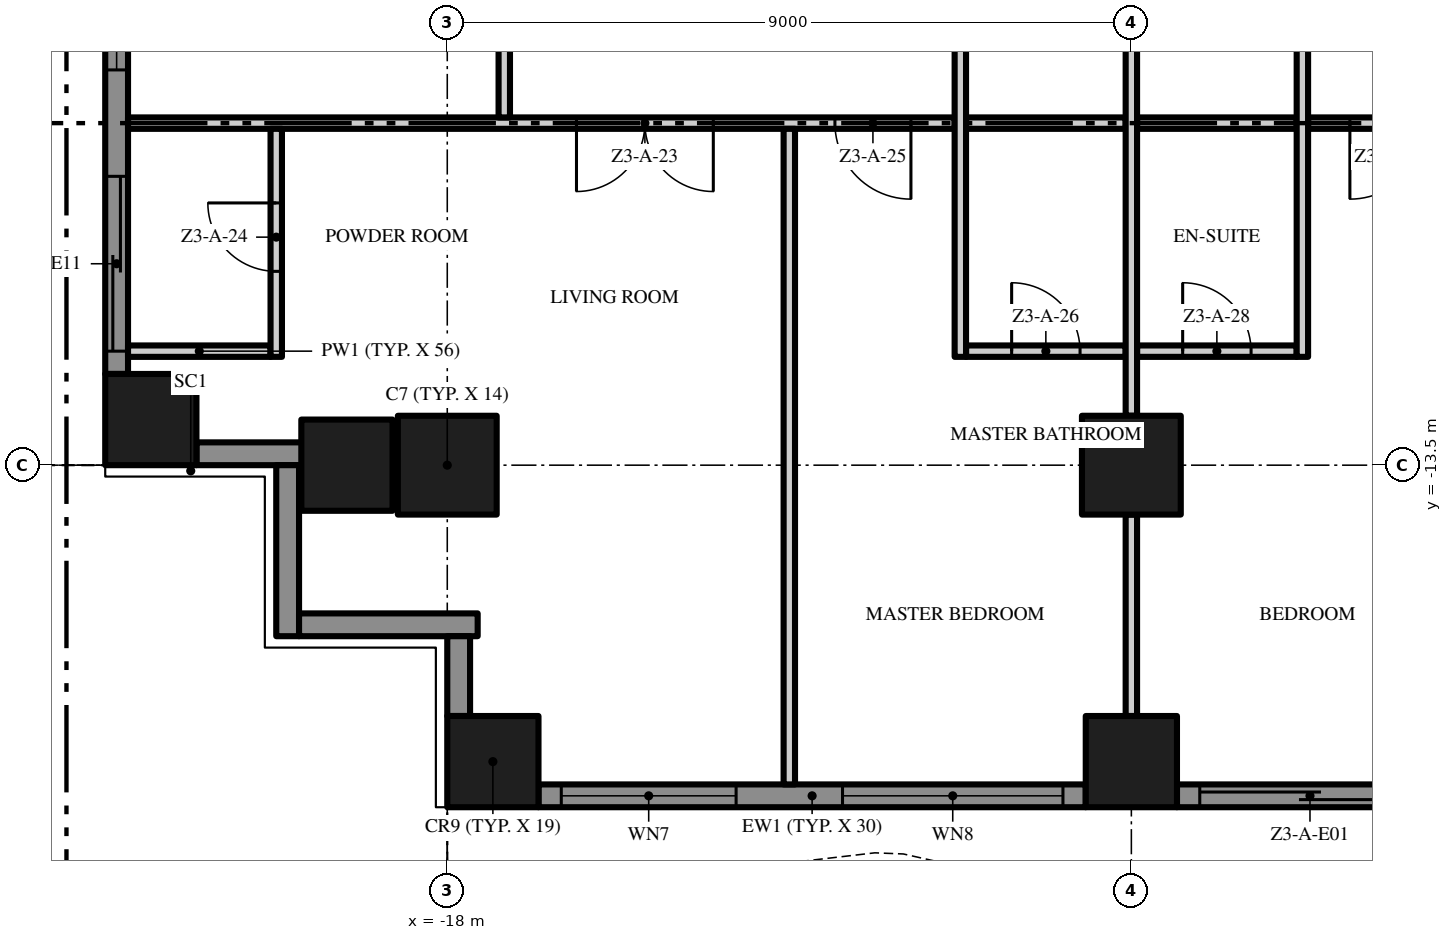
"""IFC4 building model, lengths in metres.
Left out: names, types, materials, properties, quantities, classifications, styles, units other than length and angle.
Written with IfcOpenShell. Run it as: python <this file> out.ifc"""

import sys

from ifc_helpers import new_model, si_unit, direction, frame, frame_2d, origin, origin_2d, place, context, subcontext, project, spatial, polyline, rectangle, outline, extrude, element, fill, save


model = new_model("IFC4")
c1 = context("Model", 3, precision=1e-05, world=origin(), true_north=direction((0.0, 1.0)))
c2 = subcontext(c1, "Body", "Model", "MODEL_VIEW")
j1 = project(units=[si_unit("LENGTHUNIT", "METRE"), si_unit("PLANEANGLEUNIT", "RADIAN")], contexts=[c1])
p1 = place(None, origin())
s1 = spatial("IfcSite", under=j1, at=p1, CompositionType="ELEMENT")
p2 = place(p1, origin())
s2 = spatial("IfcBuilding", under=s1, at=p2, CompositionType="ELEMENT")
p3 = place(p2, frame((0.0, 0.0, 125.0)))
s3 = spatial("IfcBuildingStorey", under=s2, at=p3, CompositionType="ELEMENT", Elevation=125.0)
p4 = place(p3, frame((-18.0, -13.5, 0.0), z_axis=(0.0, 0.0, 1.0), x_axis=(1.0, 0.0, 0.0)))
e1 = element("IfcColumn", 1, at=p4, inside=s3, PredefinedType="COLUMN", context=c2, shape_type="SweptSolid", body=[
    extrude(rectangle(XDim=1.3, YDim=1.3, at=origin_2d()), origin(), (0.0, 0.0, 1.0), 3.5),
])
for number, where, z_axis, x_axis in (
    (2, (-17.4, -17.4, 0.0), (0.0, 0.0, 1.0), (1.0, 0.0, 0.0)),
    (3, (-21.9, -12.9, 0.0), (0.0, 0.0, 1.0), (1.0, 0.0, 0.0)),
    (4, (-19.32, -13.5, 0.0), (0.0, 0.0, 1.0), (1.0, 0.0, 0.0)),
):
    element("IfcColumn", number, at=place(p3, frame(where, z_axis=z_axis, x_axis=x_axis)), inside=s3, PredefinedType="COLUMN", context=c2, shape_type="SweptSolid", body=[
        extrude(rectangle(XDim=1.2, YDim=1.2, at=origin_2d()), origin(), (0.0, 0.0, 1.0), 3.5),
    ])
p5 = place(p3, frame((-9.0, -13.5, 0.0), z_axis=(0.0, 0.0, 1.0), x_axis=(1.0, 0.0, 0.0)))
e5 = element("IfcColumn", 5, at=p5, inside=s3, PredefinedType="COLUMN", context=c2, shape_type="SweptSolid", body=[
    extrude(rectangle(XDim=1.3, YDim=1.3, at=origin_2d()), origin(), (0.0, 0.0, 1.0), 3.5),
])
p6 = place(p3, frame((-9.0, -17.4, 0.0), z_axis=(0.0, 0.0, 1.0), x_axis=(1.0, 0.0, 0.0)))
e6 = element("IfcColumn", 6, at=p6, inside=s3, PredefinedType="COLUMN", context=c2, shape_type="SweptSolid", body=[
    extrude(rectangle(XDim=1.2, YDim=1.2, at=origin_2d()), origin(), (0.0, 0.0, 1.0), 3.5),
])
p7 = place(p3, frame((-9.6, -17.85, 0.0), z_axis=(0.0, 0.0, 1.0), x_axis=(-1.0, 0.0, 0.0)))
e7 = element("IfcWall", 7, at=p7, inside=s3, PredefinedType="SOLIDWALL", context=c2, shape_type="SweptSolid", body=[
    extrude(rectangle(XDim=7.2, YDim=0.3, at=frame_2d((3.6, 0.0))), origin(), (0.0, 0.0, 1.0), 3.5),
])
p8 = place(p7, frame((4.6, 0.0, 0.45)))
e8 = element("IfcOpeningElement", 8, at=p8, cuts=e7, PredefinedType="OPENING", context=c2, shape_type="SweptSolid", body=[
    extrude(rectangle(XDim=2.3, YDim=2.65, at=frame_2d((1.15, 1.325))), frame((0.0, 0.16, 0.0), z_axis=(0.0, -1.0, 0.0), x_axis=(1.0, 0.0, 0.0)), (0.0, 0.0, 1.0), 0.32),
])
p9 = place(p7, frame((0.3, 0.0, 0.45)))
e9 = element("IfcOpeningElement", 9, at=p9, cuts=e7, PredefinedType="OPENING", context=c2, shape_type="SweptSolid", body=[
    extrude(rectangle(XDim=2.9, YDim=2.65, at=frame_2d((1.45, 1.325))), frame((0.0, 0.16, 0.0), z_axis=(0.0, -1.0, 0.0), x_axis=(1.0, 0.0, 0.0)), (0.0, 0.0, 1.0), 0.32),
])
p10 = place(p3, frame((-0.6, -17.85, 0.0), z_axis=(0.0, 0.0, 1.0), x_axis=(-1.0, 0.0, 0.0)))
e10 = element("IfcWall", 10, at=p10, inside=s3, PredefinedType="SOLIDWALL", context=c2, shape_type="SweptSolid", body=[
    extrude(rectangle(XDim=7.8, YDim=0.3, at=frame_2d((3.9, 0.0))), origin(), (0.0, 0.0, 1.0), 3.5),
])
p11 = place(p10, frame((4.6, 0.0, 0.0)))
e11 = element("IfcOpeningElement", 11, at=p11, cuts=e10, PredefinedType="OPENING", context=c2, shape_type="SweptSolid", body=[
    extrude(rectangle(XDim=2.9, YDim=2.4, at=frame_2d((1.45, 1.2))), frame((0.0, 0.16, 0.0), z_axis=(0.0, -1.0, 0.0), x_axis=(1.0, 0.0, 0.0)), (0.0, 0.0, 1.0), 0.32),
])
p12 = place(p10, frame((0.3, 0.0, 0.0)))
e12 = element("IfcOpeningElement", 12, at=p12, cuts=e10, PredefinedType="OPENING", context=c2, shape_type="SweptSolid", body=[
    extrude(rectangle(XDim=2.9, YDim=2.4, at=frame_2d((1.45, 1.2))), frame((0.0, 0.16, 0.0), z_axis=(0.0, -1.0, 0.0), x_axis=(1.0, 0.0, 0.0)), (0.0, 0.0, 1.0), 0.32),
])
p13 = place(p3, frame((-22.35, -12.3, 0.0), z_axis=(0.0, 0.0, 1.0), x_axis=(0.0, 1.0, 0.0)))
e13 = element("IfcWall", 13, at=p13, inside=s3, PredefinedType="SOLIDWALL", context=c2, shape_type="SweptSolid", body=[
    extrude(rectangle(XDim=7.2, YDim=0.3, at=frame_2d((3.6, 0.0))), origin(), (0.0, 0.0, 1.0), 3.5),
])
p14 = place(p13, frame((4.0, 0.0, 0.45)))
e14 = element("IfcOpeningElement", 14, at=p14, cuts=e13, PredefinedType="OPENING", context=c2, shape_type="SweptSolid", body=[
    extrude(rectangle(XDim=2.9, YDim=2.65, at=frame_2d((1.45, 1.325))), frame((0.0, 0.16, 0.0), z_axis=(0.0, -1.0, 0.0), x_axis=(1.0, 0.0, 0.0)), (0.0, 0.0, 1.0), 0.32),
])
p15 = place(p13, frame((0.3, 0.0, 0.0)))
e15 = element("IfcOpeningElement", 15, at=p15, cuts=e13, PredefinedType="OPENING", context=c2, shape_type="SweptSolid", body=[
    extrude(rectangle(XDim=2.3, YDim=2.4, at=frame_2d((1.15, 1.2))), frame((0.0, 0.16, 0.0), z_axis=(0.0, -1.0, 0.0), x_axis=(1.0, 0.0, 0.0)), (0.0, 0.0, 1.0), 0.32),
])
p16 = place(p3, frame((-19.85, -13.35, 0.0), z_axis=(0.0, 0.0, 1.0), x_axis=(-1.0, 0.0, 0.0)))
e16 = element("IfcWall", 16, at=p16, inside=s3, PredefinedType="SOLIDWALL", context=c2, shape_type="SweptSolid", body=[
    extrude(rectangle(XDim=1.45, YDim=0.3, at=frame_2d((0.725, 0.0))), origin(), (0.0, 0.0, 1.0), 3.5),
])
p17 = place(p3, frame((-20.1, -15.75, 0.0), z_axis=(0.0, 0.0, 1.0), x_axis=(0.0, 1.0, 0.0)))
e17 = element("IfcWall", 17, at=p17, inside=s3, PredefinedType="SOLIDWALL", context=c2, shape_type="SweptSolid", body=[
    extrude(rectangle(XDim=2.25, YDim=0.3, at=frame_2d((1.125, 0.0))), origin(), (0.0, 0.0, 1.0), 3.5),
])
p18 = place(p3, frame((-17.6, -15.6, 0.0), z_axis=(0.0, 0.0, 1.0), x_axis=(-1.0, 0.0, 0.0)))
e18 = element("IfcWall", 18, at=p18, inside=s3, PredefinedType="SOLIDWALL", context=c2, shape_type="SweptSolid", body=[
    extrude(rectangle(XDim=2.35, YDim=0.3, at=frame_2d((1.175, 0.0))), origin(), (0.0, 0.0, 1.0), 3.5),
])
p19 = place(p3, frame((-17.85, -16.8, 0.0), z_axis=(0.0, 0.0, 1.0), x_axis=(0.0, 1.0, 0.0)))
e19 = element("IfcWall", 19, at=p19, inside=s3, PredefinedType="SOLIDWALL", context=c2, shape_type="SweptSolid", body=[
    extrude(rectangle(XDim=1.05, YDim=0.3, at=frame_2d((0.525, 0.0))), origin(), (0.0, 0.0, 1.0), 3.5),
])
p20 = place(p3, origin())
e20 = element("IfcWall", 20, at=p20, inside=s3, PredefinedType="USERDEFINED", context=c2, shape_type="SweptSolid", body=[
    extrude(outline(polyline([(-18.0, -20.649), (-16.5, -19.988), (-15.0, -19.255), (-13.5, -18.731), (-12.375, -18.6), (-12.0, -18.615), (-10.5, -18.951), (-9.0, -19.612), (-7.5, -20.345), (-6.0, -20.869), (-4.875, -21.0), (-4.5, -20.985), (-3.0, -20.649), (-1.5, -19.988), (0.0, -19.255), (1.5, -18.731), (2.625, -18.6), (3.0, -18.615), (4.5, -18.951), (6.0, -19.612), (7.5, -20.345), (9.0, -20.869), (10.125, -21.0), (10.5, -20.985), (12.0, -20.649), (13.5, -19.988), (15.0, -19.255), (16.5, -18.731), (17.625, -18.6), (18.0, -18.615), (18.01, -18.365), (17.615, -18.349), (16.444, -18.486), (14.904, -19.024), (13.395, -19.761), (11.921, -20.41), (10.467, -20.736), (10.135, -20.749), (9.056, -20.624), (7.596, -20.114), (6.105, -19.385), (4.579, -18.713), (3.033, -18.366), (2.615, -18.349), (1.444, -18.486), (-0.096, -19.024), (-1.605, -19.761), (-3.079, -20.41), (-4.533, -20.736), (-4.865, -20.749), (-5.944, -20.624), (-7.404, -20.114), (-8.895, -19.385), (-10.421, -18.713), (-11.967, -18.366), (-12.385, -18.349), (-13.556, -18.486), (-15.096, -19.024), (-16.605, -19.761), (-18.101, -20.42), (-18.0, -20.649)])), origin(), (0.0, 0.0, 1.0), 0.9),
])
p21 = place(p3, origin())
e21 = element("IfcWall", 21, at=p21, inside=s3, PredefinedType="USERDEFINED", context=c2, shape_type="SweptSolid", body=[
    extrude(outline(polyline([(-25.149, 18.0), (-24.488, 16.5), (-23.755, 15.0), (-23.231, 13.5), (-23.1, 12.375), (-23.115, 12.0), (-23.451, 10.5), (-24.112, 9.0), (-24.845, 7.5), (-25.369, 6.0), (-25.5, 4.875), (-25.485, 4.5), (-25.149, 3.0), (-24.488, 1.5), (-23.755, 0.0), (-23.231, -1.5), (-23.1, -2.625), (-23.115, -3.0), (-23.451, -4.5), (-24.112, -6.0), (-24.845, -7.5), (-25.369, -9.0), (-25.5, -10.125), (-25.485, -10.5), (-25.149, -12.0), (-24.488, -13.5), (-24.259, -13.399), (-24.91, -11.921), (-25.236, -10.467), (-25.249, -10.135), (-25.124, -9.056), (-24.614, -7.596), (-23.885, -6.105), (-23.213, -4.579), (-22.866, -3.033), (-22.849, -2.615), (-22.986, -1.444), (-23.524, 0.096), (-24.261, 1.605), (-24.91, 3.079), (-25.236, 4.533), (-25.249, 4.865), (-25.124, 5.944), (-24.614, 7.404), (-23.885, 8.895), (-23.213, 10.421), (-22.866, 11.967), (-22.849, 12.385), (-22.986, 13.556), (-23.524, 15.096), (-24.261, 16.605), (-24.92, 18.101), (-25.149, 18.0)])), origin(), (0.0, 0.0, 1.0), 0.9),
])
p22 = place(p3, frame((-22.2, -12.0, 0.0), z_axis=(0.0, 0.0, 1.0), x_axis=(1.0, 0.0, 0.0)))
e22 = element("IfcWall", 22, at=p22, inside=s3, PredefinedType="PARTITIONING", context=c2, shape_type="SweptSolid", body=[
    extrude(rectangle(XDim=1.875, YDim=0.15, at=frame_2d((0.938, 0.0))), origin(), (0.0, 0.0, 1.0), 3.5),
])
p23 = place(p3, frame((-11.175, -12.0, 0.0), z_axis=(0.0, 0.0, 1.0), x_axis=(1.0, 0.0, 0.0)))
e23 = element("IfcWall", 23, at=p23, inside=s3, PredefinedType="PARTITIONING", context=c2, shape_type="SweptSolid", body=[
    extrude(rectangle(XDim=2.1, YDim=0.15, at=frame_2d((1.05, 0.0))), origin(), (0.0, 0.0, 1.0), 3.5),
])
p24 = place(p23, frame((0.6, 0.0, 0.0)))
e24 = element("IfcOpeningElement", 24, at=p24, cuts=e23, PredefinedType="OPENING", context=c2, shape_type="SweptSolid", body=[
    extrude(rectangle(XDim=0.9, YDim=2.1, at=frame_2d((0.45, 1.05))), frame((0.0, 0.085, 0.0), z_axis=(0.0, -1.0, 0.0), x_axis=(1.0, 0.0, 0.0)), (0.0, 0.0, 1.0), 0.17),
])
p25 = place(p3, frame((-8.925, -12.0, 0.0), z_axis=(0.0, 0.0, 1.0), x_axis=(1.0, 0.0, 0.0)))
e25 = element("IfcWall", 25, at=p25, inside=s3, PredefinedType="PARTITIONING", context=c2, shape_type="SweptSolid", body=[
    extrude(rectangle(XDim=2.1, YDim=0.15, at=frame_2d((1.05, 0.0))), origin(), (0.0, 0.0, 1.0), 3.5),
])
p26 = place(p25, frame((0.6, 0.0, 0.0)))
e26 = element("IfcOpeningElement", 26, at=p26, cuts=e25, PredefinedType="OPENING", context=c2, shape_type="SweptSolid", body=[
    extrude(rectangle(XDim=0.9, YDim=2.1, at=frame_2d((0.45, 1.05))), frame((0.0, 0.085, 0.0), z_axis=(0.0, -1.0, 0.0), x_axis=(1.0, 0.0, 0.0)), (0.0, 0.0, 1.0), 0.17),
])
p27 = place(p3, frame((-11.325, -9.0, 0.0), z_axis=(0.0, 0.0, 1.0), x_axis=(-1.0, 0.0, 0.0)))
e27 = element("IfcWall", 27, at=p27, inside=s3, PredefinedType="PARTITIONING", context=c2, shape_type="SweptSolid", body=[
    extrude(rectangle(XDim=10.875, YDim=0.15, at=frame_2d((5.438, 0.0))), origin(), (0.0, 0.0, 1.0), 3.5),
])
p28 = place(p27, frame((3.175, 0.0, 0.0)))
e28 = element("IfcOpeningElement", 28, at=p28, cuts=e27, PredefinedType="OPENING", context=c2, shape_type="SweptSolid", body=[
    extrude(rectangle(XDim=1.8, YDim=2.4, at=frame_2d((0.9, 1.2))), frame((0.0, 0.085, 0.0), z_axis=(0.0, -1.0, 0.0), x_axis=(1.0, 0.0, 0.0)), (0.0, 0.0, 1.0), 0.17),
])
p29 = place(p27, frame((0.575, 0.0, 0.0)))
e29 = element("IfcOpeningElement", 29, at=p29, cuts=e27, PredefinedType="OPENING", context=c2, shape_type="SweptSolid", body=[
    extrude(rectangle(XDim=1.0, YDim=2.4, at=frame_2d((0.5, 1.2))), frame((0.0, 0.085, 0.0), z_axis=(0.0, -1.0, 0.0), x_axis=(1.0, 0.0, 0.0)), (0.0, 0.0, 1.0), 0.17),
])
for number, where, z_axis, x_axis in (
    (30, (-11.175, -9.0, 0.0), (0.0, 0.0, 1.0), (1.0, 0.0, 0.0)),
    (31, (-8.925, -9.0, 0.0), (0.0, 0.0, 1.0), (1.0, 0.0, 0.0)),
):
    element("IfcWall", number, at=place(p3, frame(where, z_axis=z_axis, x_axis=x_axis)), inside=s3, PredefinedType="PARTITIONING", context=c2, shape_type="SweptSolid", body=[
        extrude(rectangle(XDim=2.1, YDim=0.15, at=frame_2d((1.05, 0.0))), origin(), (0.0, 0.0, 1.0), 3.5),
    ])
p30 = place(p3, frame((-0.075, -9.0, 0.0), z_axis=(0.0, 0.0, 1.0), x_axis=(-1.0, 0.0, 0.0)))
e32 = element("IfcWall", 32, at=p30, inside=s3, PredefinedType="PARTITIONING", context=c2, shape_type="SweptSolid", body=[
    extrude(rectangle(XDim=6.6, YDim=0.15, at=frame_2d((3.3, 0.0))), origin(), (0.0, 0.0, 1.0), 3.5),
])
p31 = place(p30, frame((5.05, 0.0, 0.0)))
e33 = element("IfcOpeningElement", 33, at=p31, cuts=e32, PredefinedType="OPENING", context=c2, shape_type="SweptSolid", body=[
    extrude(rectangle(XDim=1.0, YDim=2.4, at=frame_2d((0.5, 1.2))), frame((0.0, 0.085, 0.0), z_axis=(0.0, -1.0, 0.0), x_axis=(1.0, 0.0, 0.0)), (0.0, 0.0, 1.0), 0.17),
])
p32 = place(p30, frame((2.825, 0.0, 0.0)))
e34 = element("IfcOpeningElement", 34, at=p32, cuts=e32, PredefinedType="OPENING", context=c2, shape_type="SweptSolid", body=[
    extrude(rectangle(XDim=1.0, YDim=2.4, at=frame_2d((0.5, 1.2))), frame((0.0, 0.085, 0.0), z_axis=(0.0, -1.0, 0.0), x_axis=(1.0, 0.0, 0.0)), (0.0, 0.0, 1.0), 0.17),
])
p33 = place(p3, frame((-20.25, -12.075, 0.0), z_axis=(0.0, 0.0, 1.0), x_axis=(0.0, 1.0, 0.0)))
e35 = element("IfcWall", 35, at=p33, inside=s3, PredefinedType="PARTITIONING", context=c2, shape_type="SweptSolid", body=[
    extrude(rectangle(XDim=3.0, YDim=0.15, at=frame_2d((1.5, 0.0))), origin(), (0.0, 0.0, 1.0), 3.5),
])
p34 = place(p33, frame((1.125, 0.0, 0.0)))
e36 = element("IfcOpeningElement", 36, at=p34, cuts=e35, PredefinedType="OPENING", context=c2, shape_type="SweptSolid", body=[
    extrude(rectangle(XDim=0.9, YDim=2.1, at=frame_2d((0.45, 1.05))), frame((0.0, 0.085, 0.0), z_axis=(0.0, -1.0, 0.0), x_axis=(1.0, 0.0, 0.0)), (0.0, 0.0, 1.0), 0.17),
])
p35 = place(p3, frame((-17.25, -8.925, 0.0), z_axis=(0.0, 0.0, 1.0), x_axis=(0.0, 1.0, 0.0)))
e37 = element("IfcWall", 37, at=p35, inside=s3, PredefinedType="PARTITIONING", context=c2, shape_type="SweptSolid", body=[
    extrude(rectangle(XDim=4.5, YDim=0.15, at=frame_2d((2.25, 0.0))), origin(), (0.0, 0.0, 1.0), 3.5),
])
p36 = place(p3, frame((-13.5, -17.7, 0.0), z_axis=(0.0, 0.0, 1.0), x_axis=(0.0, 1.0, 0.0)))
e38 = element("IfcWall", 38, at=p36, inside=s3, PredefinedType="PARTITIONING", context=c2, shape_type="SweptSolid", body=[
    extrude(rectangle(XDim=8.625, YDim=0.15, at=frame_2d((4.312, 0.0))), origin(), (0.0, 0.0, 1.0), 3.5),
])
p37 = place(p3, frame((-11.25, -4.575, 0.0), z_axis=(0.0, 0.0, 1.0), x_axis=(0.0, -1.0, 0.0)))
e39 = element("IfcWall", 39, at=p37, inside=s3, PredefinedType="PARTITIONING", context=c2, shape_type="SweptSolid", body=[
    extrude(rectangle(XDim=7.5, YDim=0.15, at=frame_2d((3.75, 0.0))), origin(), (0.0, 0.0, 1.0), 3.5),
])
p38 = place(p37, frame((1.725, 0.0, 0.0)))
e40 = element("IfcOpeningElement", 40, at=p38, cuts=e39, PredefinedType="OPENING", context=c2, shape_type="SweptSolid", body=[
    extrude(rectangle(XDim=0.9, YDim=2.1, at=frame_2d((0.45, 1.05))), frame((0.0, 0.085, 0.0), z_axis=(0.0, -1.0, 0.0), x_axis=(1.0, 0.0, 0.0)), (0.0, 0.0, 1.0), 0.17),
])
p39 = place(p3, frame((-9.0, -16.8, 0.0), z_axis=(0.0, 0.0, 1.0), x_axis=(0.0, 1.0, 0.0)))
e41 = element("IfcWall", 41, at=p39, inside=s3, PredefinedType="PARTITIONING", context=c2, shape_type="SweptSolid", body=[
    extrude(rectangle(XDim=2.65, YDim=0.15, at=frame_2d((1.325, 0.0))), origin(), (0.0, 0.0, 1.0), 3.5),
])
p40 = place(p3, frame((-9.0, -12.85, 0.0), z_axis=(0.0, 0.0, 1.0), x_axis=(0.0, 1.0, 0.0)))
e42 = element("IfcWall", 42, at=p40, inside=s3, PredefinedType="PARTITIONING", context=c2, shape_type="SweptSolid", body=[
    extrude(rectangle(XDim=7.7, YDim=0.15, at=frame_2d((3.85, 0.0))), origin(), (0.0, 0.0, 1.0), 3.5),
])
p41 = place(p3, frame((-6.75, -12.075, 0.0), z_axis=(0.0, 0.0, 1.0), x_axis=(0.0, 1.0, 0.0)))
e43 = element("IfcWall", 43, at=p41, inside=s3, PredefinedType="PARTITIONING", context=c2, shape_type="SweptSolid", body=[
    extrude(rectangle(XDim=7.65, YDim=0.15, at=frame_2d((3.825, 0.0))), origin(), (0.0, 0.0, 1.0), 3.5),
])
p42 = place(p8, origin())
e44 = element("IfcWindow", 44, at=p42, inside=s3, PartitioningType="SINGLE_PANEL", PredefinedType="WINDOW", context=c2, shape_type="SweptSolid", body=[
    extrude(rectangle(XDim=2.3, YDim=2.65, at=frame_2d((1.15, 1.325))), frame((0.0, 0.03, 0.0), z_axis=(0.0, -1.0, 0.0), x_axis=(1.0, 0.0, 0.0)), (0.0, 0.0, 1.0), 0.06),
])
fill(e8, e44)
p43 = place(p9, origin())
e45 = element("IfcWindow", 45, at=p43, inside=s3, PartitioningType="SINGLE_PANEL", PredefinedType="WINDOW", context=c2, shape_type="SweptSolid", body=[
    extrude(rectangle(XDim=2.9, YDim=2.65, at=frame_2d((1.45, 1.325))), frame((0.0, 0.03, 0.0), z_axis=(0.0, -1.0, 0.0), x_axis=(1.0, 0.0, 0.0)), (0.0, 0.0, 1.0), 0.06),
])
fill(e9, e45)
p44 = place(p11, origin())
e46 = element("IfcDoor", 46, at=p44, inside=s3, OperationType="SINGLE_SWING_LEFT", PredefinedType="DOOR", context=c2, shape_type="SweptSolid", body=[
    extrude(rectangle(XDim=2.9, YDim=2.4, at=frame_2d((1.45, 1.2))), frame((0.0, 0.025, 0.0), z_axis=(0.0, -1.0, 0.0), x_axis=(1.0, 0.0, 0.0)), (0.0, 0.0, 1.0), 0.05),
])
fill(e11, e46)
p45 = place(p14, origin())
e47 = element("IfcWindow", 47, at=p45, inside=s3, PartitioningType="SINGLE_PANEL", PredefinedType="WINDOW", context=c2, shape_type="SweptSolid", body=[
    extrude(rectangle(XDim=2.9, YDim=2.65, at=frame_2d((1.45, 1.325))), frame((0.0, 0.03, 0.0), z_axis=(0.0, -1.0, 0.0), x_axis=(1.0, 0.0, 0.0)), (0.0, 0.0, 1.0), 0.06),
])
fill(e14, e47)
p46 = place(p15, origin())
e48 = element("IfcDoor", 48, at=p46, inside=s3, OperationType="SINGLE_SWING_LEFT", PredefinedType="DOOR", context=c2, shape_type="SweptSolid", body=[
    extrude(rectangle(XDim=2.3, YDim=2.4, at=frame_2d((1.15, 1.2))), frame((0.0, 0.025, 0.0), z_axis=(0.0, -1.0, 0.0), x_axis=(1.0, 0.0, 0.0)), (0.0, 0.0, 1.0), 0.05),
])
fill(e15, e48)
p47 = place(p28, origin())
e49 = element("IfcDoor", 49, at=p47, inside=s3, OperationType="DOUBLE_DOOR_SINGLE_SWING", PredefinedType="DOOR", context=c2, shape_type="SweptSolid", body=[
    extrude(rectangle(XDim=1.8, YDim=2.4, at=frame_2d((0.9, 1.2))), frame((0.0, 0.025, 0.0), z_axis=(0.0, -1.0, 0.0), x_axis=(1.0, 0.0, 0.0)), (0.0, 0.0, 1.0), 0.05),
])
fill(e28, e49)
p48 = place(p34, origin())
e50 = element("IfcDoor", 50, at=p48, inside=s3, OperationType="SINGLE_SWING_RIGHT", PredefinedType="DOOR", context=c2, shape_type="SweptSolid", body=[
    extrude(rectangle(XDim=0.9, YDim=2.1, at=frame_2d((0.45, 1.05))), frame((0.0, 0.025, 0.0), z_axis=(0.0, -1.0, 0.0), x_axis=(1.0, 0.0, 0.0)), (0.0, 0.0, 1.0), 0.05),
])
fill(e36, e50)
p49 = place(p29, origin())
e51 = element("IfcDoor", 51, at=p49, inside=s3, OperationType="SINGLE_SWING_LEFT", PredefinedType="DOOR", context=c2, shape_type="SweptSolid", body=[
    extrude(rectangle(XDim=1.0, YDim=2.4, at=frame_2d((0.5, 1.2))), frame((0.0, 0.025, 0.0), z_axis=(0.0, -1.0, 0.0), x_axis=(1.0, 0.0, 0.0)), (0.0, 0.0, 1.0), 0.05),
])
fill(e29, e51)
p50 = place(p24, origin())
e52 = element("IfcDoor", 52, at=p50, inside=s3, OperationType="SINGLE_SWING_LEFT", PredefinedType="DOOR", context=c2, shape_type="SweptSolid", body=[
    extrude(rectangle(XDim=0.9, YDim=2.1, at=frame_2d((0.45, 1.05))), frame((0.0, 0.025, 0.0), z_axis=(0.0, -1.0, 0.0), x_axis=(1.0, 0.0, 0.0)), (0.0, 0.0, 1.0), 0.05),
])
fill(e24, e52)
p51 = place(p31, origin())
e53 = element("IfcDoor", 53, at=p51, inside=s3, OperationType="SINGLE_SWING_RIGHT", PredefinedType="DOOR", context=c2, shape_type="SweptSolid", body=[
    extrude(rectangle(XDim=1.0, YDim=2.4, at=frame_2d((0.5, 1.2))), frame((0.0, 0.025, 0.0), z_axis=(0.0, -1.0, 0.0), x_axis=(1.0, 0.0, 0.0)), (0.0, 0.0, 1.0), 0.05),
])
fill(e33, e53)
p52 = place(p26, origin())
e54 = element("IfcDoor", 54, at=p52, inside=s3, OperationType="SINGLE_SWING_LEFT", PredefinedType="DOOR", context=c2, shape_type="SweptSolid", body=[
    extrude(rectangle(XDim=0.9, YDim=2.1, at=frame_2d((0.45, 1.05))), frame((0.0, 0.025, 0.0), z_axis=(0.0, -1.0, 0.0), x_axis=(1.0, 0.0, 0.0)), (0.0, 0.0, 1.0), 0.05),
])
fill(e26, e54)
save(model, sys.argv[1])
